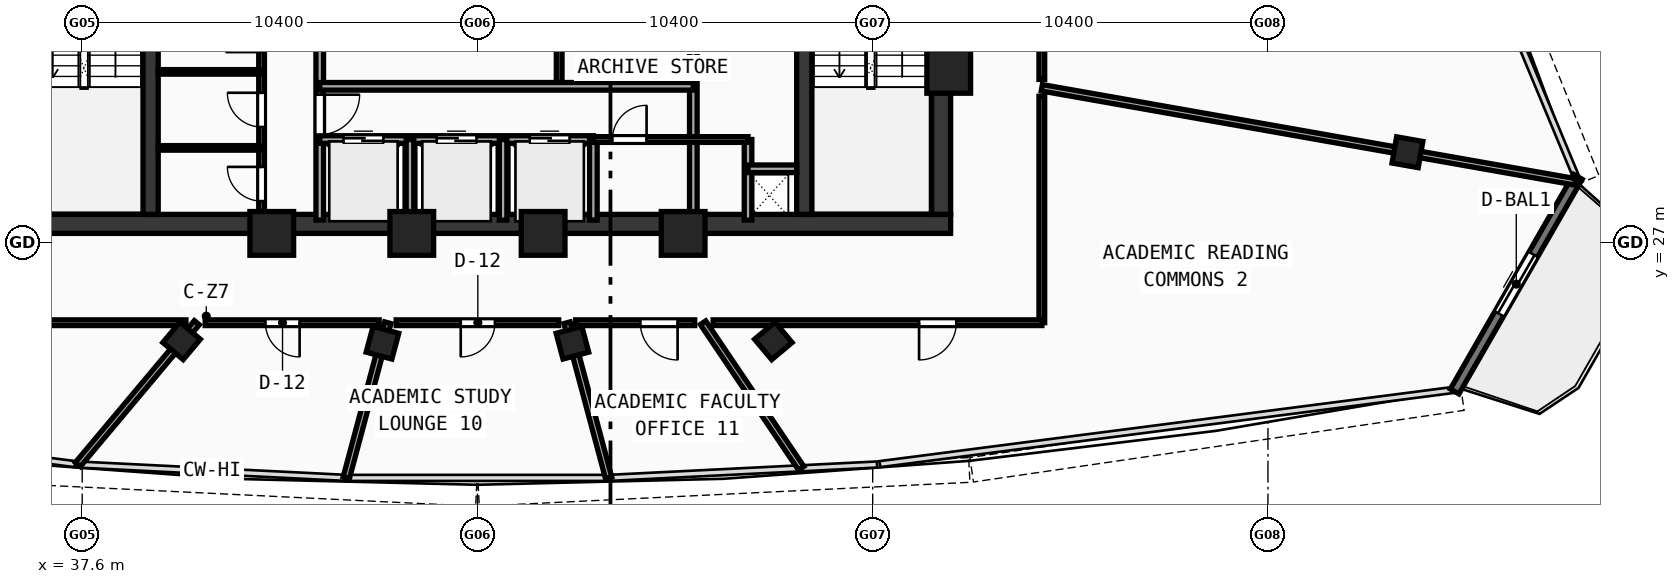
"""IFC4 building model, lengths in metres.
Left out: names, types, materials, properties, quantities, classifications, styles, units other than length and angle.
Written with IfcOpenShell. Run it as: python <this file> out.ifc"""

import sys

from ifc_helpers import new_model, si_unit, direction, frame, frame_2d, origin, origin_with_axes, origin_2d, place, context, subcontext, project, spatial, rectangle, hollow_rectangle, extrude, source, transform, mapped, element, fill, save


model = new_model("IFC4")
c1 = context("Model", 3, precision=1e-05, world=origin(), true_north=direction((0.0, 1.0)))
c2 = subcontext(c1, "Body", "Model", "MODEL_VIEW")
j1 = project(units=[si_unit("LENGTHUNIT", "METRE"), si_unit("PLANEANGLEUNIT", "RADIAN")], contexts=[c1])
p1 = place(None, origin())
s1 = spatial("IfcSite", under=j1, at=p1, CompositionType="ELEMENT")
p2 = place(p1, origin())
s2 = spatial("IfcBuilding", under=s1, at=p2, CompositionType="ELEMENT")
p3 = place(p2, frame((0.0, 0.0, 325.51)))
s3 = spatial("IfcBuildingStorey", under=s2, at=p3, CompositionType="ELEMENT", Elevation=325.51)
p4 = place(p3, frame((35.55, 27.5, 0.0), z_axis=(0.0, 0.0, 1.0), x_axis=(1.0, 0.0, 0.0)))
e1 = element("IfcWall", 1, at=p4, inside=s3, PredefinedType="SHEAR", context=c2, shape_type="SweptSolid", body=[
    extrude(rectangle(XDim=24.9, YDim=0.5, at=frame_2d((12.45, 0.0))), origin(), (0.0, 0.0, 1.0), 3.49),
])
p5 = place(p3, frame((60.2, 27.75, 0.0), z_axis=(0.0, 0.0, 1.0), x_axis=(0.0, 1.0, 0.0)))
e2 = element("IfcWall", 2, at=p5, inside=s3, PredefinedType="SHEAR", context=c2, shape_type="SweptSolid", body=[
    extrude(rectangle(XDim=12.2, YDim=0.5, at=frame_2d((6.1, 0.0))), origin(), (0.0, 0.0, 1.0), 3.49),
])
p6 = place(p3, frame((39.4, 27.75, 0.0), z_axis=(0.0, 0.0, 1.0), x_axis=(0.0, 1.0, 0.0)))
e3 = element("IfcWall", 3, at=p6, inside=s3, PredefinedType="SHEAR", context=c2, shape_type="SweptSolid", body=[
    extrude(rectangle(XDim=12.2, YDim=0.4, at=frame_2d((6.1, 0.0))), origin(), (0.0, 0.0, 1.0), 3.49),
])
p7 = place(p6, frame((10.0, 0.0, 0.0)))
e4 = element("IfcOpeningElement", 4, at=p7, cuts=e3, PredefinedType="OPENING", context=c2, shape_type="SweptSolid", body=[
    extrude(rectangle(XDim=1.1, YDim=2.1, at=frame_2d((0.55, 1.05))), frame((0.0, 0.21, 0.0), z_axis=(0.0, -1.0, 0.0), x_axis=(1.0, 0.0, 0.0)), (0.0, 0.0, 1.0), 0.42),
])
p8 = place(p3, frame((56.6, 27.75, 0.0), z_axis=(0.0, 0.0, 1.0), x_axis=(0.0, 1.0, 0.0)))
e5 = element("IfcWall", 5, at=p8, inside=s3, PredefinedType="SHEAR", context=c2, shape_type="SweptSolid", body=[
    extrude(rectangle(XDim=12.2, YDim=0.4, at=frame_2d((6.1, 0.0))), origin(), (0.0, 0.0, 1.0), 3.49),
])
p9 = place(p8, frame((10.0, 0.0, 0.0)))
e6 = element("IfcOpeningElement", 6, at=p9, cuts=e5, PredefinedType="OPENING", context=c2, shape_type="SweptSolid", body=[
    extrude(rectangle(XDim=1.1, YDim=2.1, at=frame_2d((0.55, 1.05))), frame((0.0, 0.21, 0.0), z_axis=(0.0, -1.0, 0.0), x_axis=(1.0, 0.0, 0.0)), (0.0, 0.0, 1.0), 0.42),
])
m1 = source(origin(), c2, "Body", "SweptSolid", [
    extrude(hollow_rectangle(XDim=1.15, YDim=1.15, WallThickness=0.048, at=origin_2d()), origin(), (0.0, 0.0, 1.0), 3.75),
])
for number, where, z_axis, x_axis in (
    (7, (42.588, 27.25, -0.26), (0.0, 0.0, 1.0), (1.0, 0.0, 0.0)),
    (8, (46.272, 27.25, -0.26), (0.0, 0.0, 1.0), (1.0, 0.0, 0.0)),
    (9, (49.729, 27.25, -0.26), (0.0, 0.0, 1.0), (1.0, 0.0, 0.0)),
    (10, (53.412, 27.25, -0.26), (0.0, 0.0, 1.0), (1.0, 0.0, 0.0)),
    (11, (60.4, 31.513, -0.26), (0.0, 0.0, 1.0), (1.0, 0.0, 0.0)),
):
    element("IfcColumn", number, at=place(p3, frame(where, z_axis=z_axis, x_axis=x_axis)), inside=s3, PredefinedType="COLUMN", context=c2, shape_type="MappedRepresentation", body=[
        mapped(m1, transform((0.0, 0.0, 0.0), scale=1.0)),
    ])
m2 = source(origin(), c2, "Body", "SweptSolid", [
    extrude(hollow_rectangle(XDim=0.7, YDim=0.7, WallThickness=0.026, at=origin_2d()), origin(), (0.0, 0.0, 1.0), 3.75),
])
for number, where, z_axis, x_axis in (
    (12, (40.215, 24.422, -0.26), (0.0, 0.0, 1.0), (0.766, -0.643, 0.0)),
    (13, (45.501, 24.373, -0.26), (0.0, 0.0, 1.0), (0.966, -0.259, 0.0)),
    (14, (50.499, 24.373, -0.26), (0.0, 0.0, 1.0), (0.966, 0.259, 0.0)),
    (15, (55.785, 24.422, -0.26), (0.0, 0.0, 1.0), (0.766, 0.643, 0.0)),
    (16, (72.47, 29.385, -0.26), (0.0, 0.0, 1.0), (0.174, 0.985, 0.0)),
):
    element("IfcColumn", number, at=place(p3, frame(where, z_axis=z_axis, x_axis=x_axis)), inside=s3, PredefinedType="COLUMN", context=c2, shape_type="MappedRepresentation", body=[
        mapped(m2, transform((0.0, 0.0, 0.0), scale=1.0)),
    ])
p10 = place(p3, frame((73.712, 23.091, 0.0), z_axis=(0.0, 0.0, 1.0), x_axis=(0.49793434898, 0.867214727796, 0.0)))
e17 = element("IfcWall", 17, at=p10, inside=s3, PredefinedType="STANDARD", context=c2, shape_type="SweptSolid", body=[
    extrude(rectangle(XDim=6.513, YDim=0.26, at=frame_2d((3.256, 0.0))), origin(), (0.0, 0.0, 1.0), 3.49),
])
p11 = place(p10, frame((2.356, 0.0, 0.0)))
e18 = element("IfcOpeningElement", 18, at=p11, cuts=e17, PredefinedType="OPENING", context=c2, shape_type="SweptSolid", body=[
    extrude(rectangle(XDim=1.8, YDim=2.15, at=frame_2d((0.9, 1.075))), frame((0.0, 0.14, 0.0), z_axis=(0.0, -1.0, 0.0), x_axis=(1.0, 0.0, 0.0)), (0.0, 0.0, 1.0), 0.28),
])
p12 = place(p3, frame((43.85, 27.6, 0.0), z_axis=(0.0, 0.0, 1.0), x_axis=(0.0, 1.0, 0.0)))
e19 = element("IfcWall", 19, at=p12, inside=s3, PredefinedType="SOLIDWALL", context=c2, shape_type="SweptSolid", body=[
    extrude(rectangle(XDim=6.22, YDim=0.2, at=frame_2d((3.11, 0.0))), origin(), (0.0, 0.0, 1.0), 3.49),
])
p13 = place(p12, frame((2.25, 0.0, 0.0)))
e20 = element("IfcOpeningElement", 20, at=p13, cuts=e19, PredefinedType="OPENING", context=c2, shape_type="SweptSolid", body=[
    extrude(rectangle(XDim=1.05, YDim=2.1, at=frame_2d((0.525, 1.05))), frame((0.0, 0.11, 0.0), z_axis=(0.0, -1.0, 0.0), x_axis=(1.0, 0.0, 0.0)), (0.0, 0.0, 1.0), 0.22),
])
p14 = place(p3, frame((53.68, 27.6, 0.0), z_axis=(0.0, 0.0, 1.0), x_axis=(0.0, 1.0, 0.0)))
e21 = element("IfcWall", 21, at=p14, inside=s3, PredefinedType="SOLIDWALL", context=c2, shape_type="SweptSolid", body=[
    extrude(rectangle(XDim=9.05, YDim=0.2, at=frame_2d((4.525, 0.0))), origin(), (0.0, 0.0, 1.0), 3.49),
])
p15 = place(p14, frame((6.9, 0.0, 0.0)))
e22 = element("IfcOpeningElement", 22, at=p15, cuts=e21, PredefinedType="OPENING", context=c2, shape_type="SweptSolid", body=[
    extrude(rectangle(XDim=1.05, YDim=2.1, at=frame_2d((0.525, 1.05))), frame((0.0, 0.11, 0.0), z_axis=(0.0, -1.0, 0.0), x_axis=(1.0, 0.0, 0.0)), (0.0, 0.0, 1.0), 0.22),
])
p16 = place(p3, frame((50.15, 31.12, 0.0), z_axis=(0.0, 0.0, 1.0), x_axis=(0.0, 1.0, 0.0)))
e23 = element("IfcWall", 23, at=p16, inside=s3, PredefinedType="PARTITIONING", context=c2, shape_type="SweptSolid", body=[
    extrude(rectangle(XDim=2.7, YDim=0.15, at=frame_2d((1.35, 0.0))), origin(), (0.0, 0.0, 1.0), 3.49),
])
p17 = place(p3, frame((43.85, 29.72, 0.0), z_axis=(0.0, 0.0, 1.0), x_axis=(1.0, 0.0, 0.0)))
e24 = element("IfcWall", 24, at=p17, inside=s3, PredefinedType="SOLIDWALL", context=c2, shape_type="SweptSolid", body=[
    extrude(rectangle(XDim=7.2, YDim=0.2, at=frame_2d((3.6, 0.0))), origin(), (0.0, 0.0, 1.0), 3.49),
])
p18 = place(p17, frame((0.625, 0.0, 0.0)))
e25 = element("IfcOpeningElement", 25, at=p18, cuts=e24, PredefinedType="OPENING", context=c2, shape_type="SweptSolid", body=[
    extrude(rectangle(XDim=1.05, YDim=2.1, at=frame_2d((0.525, 1.05))), frame((0.0, 0.11, 0.0), z_axis=(0.0, -1.0, 0.0), x_axis=(1.0, 0.0, 0.0)), (0.0, 0.0, 1.0), 0.22),
])
p19 = place(p17, frame((3.075, 0.0, 0.0)))
e26 = element("IfcOpeningElement", 26, at=p19, cuts=e24, PredefinedType="OPENING", context=c2, shape_type="SweptSolid", body=[
    extrude(rectangle(XDim=1.05, YDim=2.1, at=frame_2d((0.525, 1.05))), frame((0.0, 0.11, 0.0), z_axis=(0.0, -1.0, 0.0), x_axis=(1.0, 0.0, 0.0)), (0.0, 0.0, 1.0), 0.22),
])
p20 = place(p17, frame((5.525, 0.0, 0.0)))
e27 = element("IfcOpeningElement", 27, at=p20, cuts=e24, PredefinedType="OPENING", context=c2, shape_type="SweptSolid", body=[
    extrude(rectangle(XDim=1.05, YDim=2.1, at=frame_2d((0.525, 1.05))), frame((0.0, 0.11, 0.0), z_axis=(0.0, -1.0, 0.0), x_axis=(1.0, 0.0, 0.0)), (0.0, 0.0, 1.0), 0.22),
])
p21 = place(p3, frame((51.05, 27.6, 0.0), z_axis=(0.0, 0.0, 1.0), x_axis=(0.0, 1.0, 0.0)))
e28 = element("IfcWall", 28, at=p21, inside=s3, PredefinedType="SOLIDWALL", context=c2, shape_type="SweptSolid", body=[
    extrude(rectangle(XDim=2.12, YDim=0.2, at=frame_2d((1.06, 0.0))), origin(), (0.0, 0.0, 1.0), 3.49),
])
p22 = place(p3, frame((43.85, 31.12, 0.0), z_axis=(0.0, 0.0, 1.0), x_axis=(1.0, 0.0, 0.0)))
e29 = element("IfcWall", 29, at=p22, inside=s3, PredefinedType="SOLIDWALL", context=c2, shape_type="SweptSolid", body=[
    extrude(rectangle(XDim=9.83, YDim=0.2, at=frame_2d((4.915, 0.0))), origin(), (0.0, 0.0, 1.0), 3.49),
])
for number, where, z_axis, x_axis in (
    (30, (46.225, 27.6, 0.0), (0.0, 0.0, 1.0), (0.0, 1.0, 0.0)),
    (31, (48.675, 27.6, 0.0), (0.0, 0.0, 1.0), (0.0, 1.0, 0.0)),
    (32, (55.12, 27.6, 0.0), (0.0, 0.0, 1.0), (0.0, 1.0, 0.0)),
):
    element("IfcWall", number, at=place(p3, frame(where, z_axis=z_axis, x_axis=x_axis)), inside=s3, PredefinedType="SOLIDWALL", context=c2, shape_type="SweptSolid", body=[
        extrude(rectangle(XDim=2.12, YDim=0.2, at=frame_2d((1.06, 0.0))), origin(), (0.0, 0.0, 1.0), 3.49),
    ])
p23 = place(p3, frame((55.12, 28.95, 0.0), z_axis=(0.0, 0.0, 1.0), x_axis=(1.0, 0.0, 0.0)))
e33 = element("IfcWall", 33, at=p23, inside=s3, PredefinedType="SOLIDWALL", context=c2, shape_type="SweptSolid", body=[
    extrude(rectangle(XDim=1.28, YDim=0.2, at=frame_2d((0.64, 0.0))), origin(), (0.0, 0.0, 1.0), 3.49),
])
p24 = place(p3, frame((42.32, 27.6, 0.0), z_axis=(0.0, 0.0, 1.0), x_axis=(0.0, 1.0, 0.0)))
e34 = element("IfcWall", 34, at=p24, inside=s3, PredefinedType="PARTITIONING", context=c2, shape_type="SweptSolid", body=[
    extrude(rectangle(XDim=5.9, YDim=0.15, at=frame_2d((2.95, 0.0))), origin(), (0.0, 0.0, 1.0), 3.49),
])
p25 = place(p24, frame((0.5, 0.0, 0.0)))
e35 = element("IfcOpeningElement", 35, at=p25, cuts=e34, PredefinedType="OPENING", context=c2, shape_type="SweptSolid", body=[
    extrude(rectangle(XDim=0.9, YDim=2.1, at=frame_2d((0.45, 1.05))), frame((0.0, 0.085, 0.0), z_axis=(0.0, -1.0, 0.0), x_axis=(1.0, 0.0, 0.0)), (0.0, 0.0, 1.0), 0.17),
])
p26 = place(p24, frame((2.45, 0.0, 0.0)))
e36 = element("IfcOpeningElement", 36, at=p26, cuts=e34, PredefinedType="OPENING", context=c2, shape_type="SweptSolid", body=[
    extrude(rectangle(XDim=0.9, YDim=2.1, at=frame_2d((0.45, 1.05))), frame((0.0, 0.085, 0.0), z_axis=(0.0, -1.0, 0.0), x_axis=(1.0, 0.0, 0.0)), (0.0, 0.0, 1.0), 0.17),
])
p27 = place(p24, frame((4.42, 0.0, 0.0)))
e37 = element("IfcOpeningElement", 37, at=p27, cuts=e34, PredefinedType="OPENING", context=c2, shape_type="SweptSolid", body=[
    extrude(rectangle(XDim=0.94, YDim=2.1, at=frame_2d((0.47, 1.05))), frame((0.0, 0.085, 0.0), z_axis=(0.0, -1.0, 0.0), x_axis=(1.0, 0.0, 0.0)), (0.0, 0.0, 1.0), 0.17),
])
p28 = place(p3, frame((51.05, 29.72, 0.0), z_axis=(0.0, 0.0, 1.0), x_axis=(1.0, 0.0, 0.0)))
e38 = element("IfcWall", 38, at=p28, inside=s3, PredefinedType="PARTITIONING", context=c2, shape_type="SweptSolid", body=[
    extrude(rectangle(XDim=4.07, YDim=0.15, at=frame_2d((2.035, 0.0))), origin(), (0.0, 0.0, 1.0), 3.49),
])
p29 = place(p28, frame((0.5, 0.0, 0.0)))
e39 = element("IfcOpeningElement", 39, at=p29, cuts=e38, PredefinedType="OPENING", context=c2, shape_type="SweptSolid", body=[
    extrude(rectangle(XDim=0.9, YDim=2.1, at=frame_2d((0.45, 1.05))), frame((0.0, 0.085, 0.0), z_axis=(0.0, -1.0, 0.0), x_axis=(1.0, 0.0, 0.0)), (0.0, 0.0, 1.0), 0.17),
])
for number, where, z_axis, x_axis in (
    (40, (39.6, 29.5, 0.0), (0.0, 0.0, 1.0), (1.0, 0.0, 0.0)),
    (41, (39.6, 31.5, 0.0), (0.0, 0.0, 1.0), (1.0, 0.0, 0.0)),
):
    element("IfcWall", number, at=place(p3, frame(where, z_axis=z_axis, x_axis=x_axis)), inside=s3, PredefinedType="PARTITIONING", context=c2, shape_type="SweptSolid", body=[
        extrude(rectangle(XDim=2.72, YDim=0.12, at=frame_2d((1.36, 0.0))), origin(), (0.0, 0.0, 1.0), 3.49),
    ])
p30 = place(p3, frame((40.616, 24.9, 0.0), z_axis=(0.0, 0.0, 1.0), x_axis=(-0.642804014728, -0.766030677355, 0.0)))
e42 = element("IfcWall", 42, at=p30, inside=s3, PredefinedType="PARTITIONING", context=c2, shape_type="SweptSolid", body=[
    extrude(rectangle(XDim=4.87, YDim=0.17, at=frame_2d((2.435, 0.0))), origin(), (0.0, 0.0, 1.0), 2.89),
])
for number, where, z_axis, x_axis in (
    (43, (45.642, 24.9, 0.0), (0.0, 0.0, 1.0), (-0.259, -0.966, 0.0)),
    (44, (50.358, 24.9, 0.0), (0.0, 0.0, 1.0), (0.259, -0.966, 0.0)),
):
    element("IfcWall", number, at=place(p3, frame(where, z_axis=z_axis, x_axis=x_axis)), inside=s3, PredefinedType="PARTITIONING", context=c2, shape_type="SweptSolid", body=[
        extrude(rectangle(XDim=4.227, YDim=0.17, at=frame_2d((2.114, 0.0))), origin(), (0.0, 0.0, 1.0), 2.89),
    ])
p31 = place(p3, frame((53.936, 24.9, 0.0), z_axis=(0.0, 0.0, 1.0), x_axis=(0.559204176839, -0.829029968461, 0.0)))
e45 = element("IfcWall", 45, at=p31, inside=s3, PredefinedType="PARTITIONING", context=c2, shape_type="SweptSolid", body=[
    extrude(rectangle(XDim=4.62, YDim=0.17, at=frame_2d((2.31, 0.0))), origin(), (0.0, 0.0, 1.0), 2.89),
])
p32 = place(p3, frame((62.85, 31.082, 0.0), z_axis=(0.0, 0.0, 1.0), x_axis=(0.984807879062, -0.173647462802, 0.0)))
e46 = element("IfcWall", 46, at=p32, inside=s3, PredefinedType="PARTITIONING", context=c2, shape_type="SweptSolid", body=[
    extrude(rectangle(XDim=14.244, YDim=0.17, at=frame_2d((7.122, 0.0))), origin(), (0.0, 0.0, 1.0), 2.89),
])
p33 = place(p3, frame((62.85, 38.305, 0.0), z_axis=(0.0, 0.0, 1.0), x_axis=(0.0, -1.0, 0.0)))
e47 = element("IfcWall", 47, at=p33, inside=s3, PredefinedType="PARTITIONING", context=c2, shape_type="SweptSolid", body=[
    extrude(rectangle(XDim=7.004, YDim=0.15, at=frame_2d((3.502, 0.0))), origin(), (0.0, 0.0, 1.0), 3.49),
])
p34 = place(p33, frame((3.027, 0.0, 0.0)))
e48 = element("IfcOpeningElement", 48, at=p34, cuts=e47, PredefinedType="OPENING", context=c2, shape_type="SweptSolid", body=[
    extrude(rectangle(XDim=0.98, YDim=2.12, at=frame_2d((0.49, 1.06))), frame((0.0, 0.085, 0.0), z_axis=(0.0, -1.0, 0.0), x_axis=(1.0, 0.0, 0.0)), (0.0, 0.0, 1.0), 0.17),
])
p35 = place(p3, frame((62.85, 30.858, 0.0), z_axis=(0.0, 0.0, 1.0), x_axis=(0.0, -1.0, 0.0)))
e49 = element("IfcWall", 49, at=p35, inside=s3, PredefinedType="PARTITIONING", context=c2, shape_type="SweptSolid", body=[
    extrude(rectangle(XDim=5.958, YDim=0.15, at=frame_2d((2.979, 0.0))), origin(), (0.0, 0.0, 1.0), 2.89),
])
p36 = place(p3, frame((62.85, 24.9, 0.0), z_axis=(0.0, 0.0, 1.0), x_axis=(-1.0, 0.0, 0.0)))
e50 = element("IfcWall", 50, at=p36, inside=s3, PredefinedType="PARTITIONING", context=c2, shape_type="SweptSolid", body=[
    extrude(rectangle(XDim=8.649, YDim=0.15, at=frame_2d((4.324, 0.0))), origin(), (0.0, 0.0, 1.0), 2.89),
])
p37 = place(p36, frame((2.25, 0.0, 0.0)))
e51 = element("IfcOpeningElement", 51, at=p37, cuts=e50, PredefinedType="OPENING", context=c2, shape_type="SweptSolid", body=[
    extrude(rectangle(XDim=0.98, YDim=2.12, at=frame_2d((0.49, 1.06))), frame((0.0, 0.085, 0.0), z_axis=(0.0, -1.0, 0.0), x_axis=(1.0, 0.0, 0.0)), (0.0, 0.0, 1.0), 0.17),
])
p38 = place(p3, frame((53.716, 24.9, 0.0), z_axis=(0.0, 0.0, 1.0), x_axis=(-1.0, 0.0, 0.0)))
e52 = element("IfcWall", 52, at=p38, inside=s3, PredefinedType="PARTITIONING", context=c2, shape_type="SweptSolid", body=[
    extrude(rectangle(XDim=3.13, YDim=0.15, at=frame_2d((1.565, 0.0))), origin(), (0.0, 0.0, 1.0), 3.49),
])
p39 = place(p38, frame((0.449, 0.0, 0.0)))
e53 = element("IfcOpeningElement", 53, at=p39, cuts=e52, PredefinedType="OPENING", context=c2, shape_type="SweptSolid", body=[
    extrude(rectangle(XDim=0.98, YDim=2.12, at=frame_2d((0.49, 1.06))), frame((0.0, 0.085, 0.0), z_axis=(0.0, -1.0, 0.0), x_axis=(1.0, 0.0, 0.0)), (0.0, 0.0, 1.0), 0.17),
])
p40 = place(p3, frame((50.138, 24.9, 0.0), z_axis=(0.0, 0.0, 1.0), x_axis=(-1.0, 0.0, 0.0)))
e54 = element("IfcWall", 54, at=p40, inside=s3, PredefinedType="PARTITIONING", context=c2, shape_type="SweptSolid", body=[
    extrude(rectangle(XDim=4.276, YDim=0.15, at=frame_2d((2.138, 0.0))), origin(), (0.0, 0.0, 1.0), 3.49),
])
p41 = place(p40, frame((1.678, 0.0, 0.0)))
e55 = element("IfcOpeningElement", 55, at=p41, cuts=e54, PredefinedType="OPENING", context=c2, shape_type="SweptSolid", body=[
    extrude(rectangle(XDim=0.9, YDim=2.08, at=frame_2d((0.45, 1.04))), frame((0.0, 0.085, 0.0), z_axis=(0.0, -1.0, 0.0), x_axis=(1.0, 0.0, 0.0)), (0.0, 0.0, 1.0), 0.17),
])
p42 = place(p3, frame((45.414, 24.9, 0.0), z_axis=(0.0, 0.0, 1.0), x_axis=(-1.0, 0.0, 0.0)))
e56 = element("IfcWall", 56, at=p42, inside=s3, PredefinedType="PARTITIONING", context=c2, shape_type="SweptSolid", body=[
    extrude(rectangle(XDim=4.579, YDim=0.15, at=frame_2d((2.289, 0.0))), origin(), (0.0, 0.0, 1.0), 3.49),
])
p43 = place(p42, frame((2.093, 0.0, 0.0)))
e57 = element("IfcOpeningElement", 57, at=p43, cuts=e56, PredefinedType="OPENING", context=c2, shape_type="SweptSolid", body=[
    extrude(rectangle(XDim=0.9, YDim=2.08, at=frame_2d((0.45, 1.04))), frame((0.0, 0.085, 0.0), z_axis=(0.0, -1.0, 0.0), x_axis=(1.0, 0.0, 0.0)), (0.0, 0.0, 1.0), 0.17),
])
p44 = place(p3, frame((40.329, 24.9, 0.0), z_axis=(0.0, 0.0, 1.0), x_axis=(-1.0, 0.0, 0.0)))
e58 = element("IfcWall", 58, at=p44, inside=s3, PredefinedType="PARTITIONING", context=c2, shape_type="SweptSolid", body=[
    extrude(rectangle(XDim=7.179, YDim=0.15, at=frame_2d((3.589, 0.0))), origin(), (0.0, 0.0, 1.0), 2.89),
])
m3 = source(origin(), c2, "Body", "SweptSolid", [
    extrude(rectangle(XDim=1.8, YDim=2.15, at=frame_2d((0.9, 1.075))), frame((0.0, 0.025, 0.0), z_axis=(0.0, -1.0, 0.0), x_axis=(1.0, 0.0, 0.0)), (0.0, 0.0, 1.0), 0.05),
])
p45 = place(p11, origin_with_axes())
e59 = element("IfcDoor", 59, at=p45, inside=s3, OperationType="DOUBLE_DOOR_SLIDING", PredefinedType="DOOR", context=c2, shape_type="MappedRepresentation", body=[
    mapped(m3, transform((0.0, 0.0, 0.0), scale=1.0)),
])
fill(e18, e59)
m4 = source(origin(), c2, "Body", "SweptSolid", [
    extrude(rectangle(XDim=1.05, YDim=2.1, at=frame_2d((0.525, 1.05))), frame((0.0, 0.025, 0.0), z_axis=(0.0, -1.0, 0.0), x_axis=(1.0, 0.0, 0.0)), (0.0, 0.0, 1.0), 0.05),
])
p46 = place(p13, frame((1.05, 0.0, 0.0), z_axis=(0.0, 0.0, 1.0), x_axis=(-1.0, 0.0, 0.0)))
e60 = element("IfcDoor", 60, at=p46, inside=s3, OperationType="SINGLE_SWING_LEFT", PredefinedType="DOOR", context=c2, shape_type="MappedRepresentation", body=[
    mapped(m4, transform((0.0, 0.0, 0.0), scale=1.0)),
])
fill(e20, e60)
p47 = place(p18, origin_with_axes())
e61 = element("IfcDoor", 61, at=p47, inside=s3, OperationType="DOUBLE_DOOR_SLIDING", PredefinedType="DOOR", context=c2, shape_type="MappedRepresentation", body=[
    mapped(m4, transform((0.0, 0.0, 0.0), scale=1.0)),
])
fill(e25, e61)
p48 = place(p19, origin_with_axes())
e62 = element("IfcDoor", 62, at=p48, inside=s3, OperationType="DOUBLE_DOOR_SLIDING", PredefinedType="DOOR", context=c2, shape_type="MappedRepresentation", body=[
    mapped(m4, transform((0.0, 0.0, 0.0), scale=1.0)),
])
fill(e26, e62)
p49 = place(p20, origin_with_axes())
e63 = element("IfcDoor", 63, at=p49, inside=s3, OperationType="DOUBLE_DOOR_SLIDING", PredefinedType="DOOR", context=c2, shape_type="MappedRepresentation", body=[
    mapped(m4, transform((0.0, 0.0, 0.0), scale=1.0)),
])
fill(e27, e63)
m5 = source(origin(), c2, "Body", "SweptSolid", [
    extrude(rectangle(XDim=0.9, YDim=2.1, at=frame_2d((0.45, 1.05))), frame((0.0, 0.025, 0.0), z_axis=(0.0, -1.0, 0.0), x_axis=(1.0, 0.0, 0.0)), (0.0, 0.0, 1.0), 0.05),
])
p50 = place(p25, origin_with_axes())
e64 = element("IfcDoor", 64, at=p50, inside=s3, OperationType="SINGLE_SWING_RIGHT", PredefinedType="DOOR", context=c2, shape_type="MappedRepresentation", body=[
    mapped(m5, transform((0.0, 0.0, 0.0), scale=1.0)),
])
fill(e35, e64)
p51 = place(p26, origin_with_axes())
e65 = element("IfcDoor", 65, at=p51, inside=s3, OperationType="SINGLE_SWING_RIGHT", PredefinedType="DOOR", context=c2, shape_type="MappedRepresentation", body=[
    mapped(m5, transform((0.0, 0.0, 0.0), scale=1.0)),
])
fill(e36, e65)
p52 = place(p29, origin_with_axes())
e66 = element("IfcDoor", 66, at=p52, inside=s3, OperationType="SINGLE_SWING_RIGHT", PredefinedType="DOOR", context=c2, shape_type="MappedRepresentation", body=[
    mapped(m5, transform((0.0, 0.0, 0.0), scale=1.0)),
])
fill(e39, e66)
m6 = source(origin(), c2, "Body", "SweptSolid", [
    extrude(rectangle(XDim=0.9, YDim=2.08, at=frame_2d((0.45, 1.04))), frame((0.0, 0.025, 0.0), z_axis=(0.0, -1.0, 0.0), x_axis=(1.0, 0.0, 0.0)), (0.0, 0.0, 1.0), 0.05),
])
p53 = place(p43, origin_with_axes())
e67 = element("IfcDoor", 67, at=p53, inside=s3, OperationType="SINGLE_SWING_LEFT", PredefinedType="DOOR", context=c2, shape_type="MappedRepresentation", body=[
    mapped(m6, transform((0.0, 0.0, 0.0), scale=1.0)),
])
fill(e57, e67)
p54 = place(p41, origin_with_axes())
e68 = element("IfcDoor", 68, at=p54, inside=s3, OperationType="SINGLE_SWING_RIGHT", PredefinedType="DOOR", context=c2, shape_type="MappedRepresentation", body=[
    mapped(m6, transform((0.0, 0.0, 0.0), scale=1.0)),
])
fill(e55, e68)
m7 = source(origin(), c2, "Body", "SweptSolid", [
    extrude(rectangle(XDim=0.98, YDim=2.12, at=frame_2d((0.49, 1.06))), frame((0.0, 0.025, 0.0), z_axis=(0.0, -1.0, 0.0), x_axis=(1.0, 0.0, 0.0)), (0.0, 0.0, 1.0), 0.05),
])
p55 = place(p39, origin_with_axes())
e69 = element("IfcDoor", 69, at=p55, inside=s3, OperationType="SINGLE_SWING_LEFT", PredefinedType="DOOR", context=c2, shape_type="MappedRepresentation", body=[
    mapped(m7, transform((0.0, 0.0, 0.0), scale=1.0)),
])
fill(e53, e69)
p56 = place(p37, origin_with_axes())
e70 = element("IfcDoor", 70, at=p56, inside=s3, OperationType="SINGLE_SWING_RIGHT", PredefinedType="DOOR", context=c2, shape_type="MappedRepresentation", body=[
    mapped(m7, transform((0.0, 0.0, 0.0), scale=1.0)),
])
fill(e51, e70)
save(model, sys.argv[1])
